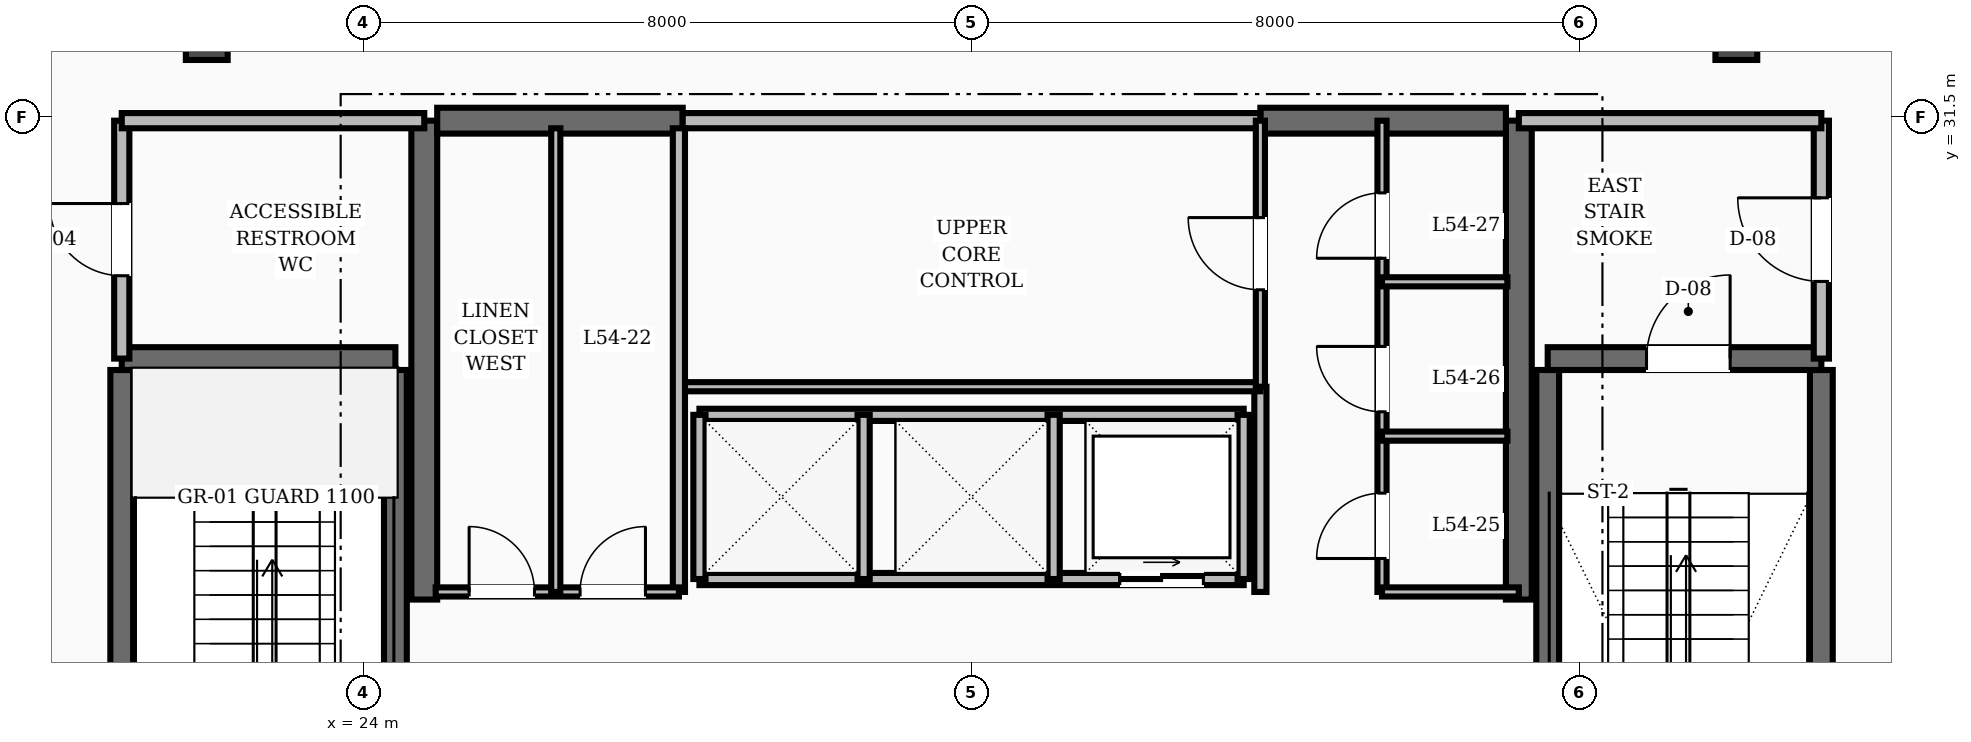
"""IFC4 building model, lengths in metres.
Left out: names, types, materials, properties, quantities, classifications, styles, units other than length and angle.
Written with IfcOpenShell. Run it as: python <this file> out.ifc"""

import sys

from ifc_helpers import new_model, si_unit, direction, frame, frame_2d, origin, place, context, subcontext, project, spatial, rectangle, extrude, element, fill, save


model = new_model("IFC4")
c1 = context("Model", 3, precision=1e-05, world=origin(), true_north=direction((0.0, 1.0)))
c2 = subcontext(c1, "Body", "Model", "MODEL_VIEW")
j1 = project(units=[si_unit("LENGTHUNIT", "METRE"), si_unit("PLANEANGLEUNIT", "RADIAN")], contexts=[c1])
p1 = place(None, origin())
s1 = spatial("IfcSite", under=j1, at=p1, CompositionType="ELEMENT")
p2 = place(p1, origin())
s2 = spatial("IfcBuilding", under=s1, at=p2, CompositionType="ELEMENT")
p3 = place(p2, frame((0.0, 0.0, 208.4)))
s3 = spatial("IfcBuildingStorey", under=s2, at=p3, CompositionType="ELEMENT", Elevation=208.4)
for number, where, z_axis, x_axis in (
    (1, (24.8, 25.15, 0.0), (0.0, 0.0, 1.0), (0.0, 1.0, 0.0)),
    (2, (39.2, 25.15, 0.0), (0.0, 0.0, 1.0), (0.0, 1.0, 0.0)),
):
    element("IfcWall", number, at=place(p3, frame(where, z_axis=z_axis, x_axis=x_axis)), inside=s3, PredefinedType="SHEAR", context=c2, shape_type="SweptSolid", body=[
        extrude(rectangle(XDim=6.3, YDim=0.34, at=frame_2d((3.15, 0.0))), origin(), (0.0, 0.0, 1.0), 6.4),
    ])
for number, where, z_axis, x_axis in (
    (3, (24.97, 31.45, 0.0), (0.0, 0.0, 1.0), (1.0, 0.0, 0.0)),
    (4, (35.8, 31.45, 0.0), (0.0, 0.0, 1.0), (1.0, 0.0, 0.0)),
):
    element("IfcWall", number, at=place(p3, frame(where, z_axis=z_axis, x_axis=x_axis)), inside=s3, PredefinedType="SHEAR", context=c2, shape_type="SweptSolid", body=[
        extrude(rectangle(XDim=3.23, YDim=0.34, at=frame_2d((1.615, 0.0))), origin(), (0.0, 0.0, 1.0), 6.4),
    ])
for number, where, z_axis, x_axis in (
    (5, (20.82, 19.43, 0.0), (0.0, 0.0, 1.0), (0.0, 1.0, 0.0)),
    (6, (24.42, 19.43, 0.0), (0.0, 0.0, 1.0), (0.0, 1.0, 0.0)),
):
    element("IfcWall", number, at=place(p3, frame(where, z_axis=z_axis, x_axis=x_axis)), inside=s3, PredefinedType="SHEAR", context=c2, shape_type="SweptSolid", body=[
        extrude(rectangle(XDim=8.74, YDim=0.3, at=frame_2d((4.37, 0.0))), origin(), (0.0, 0.0, 1.0), 6.4),
    ])
p4 = place(p3, frame((20.82, 28.32, 0.0), z_axis=(0.0, 0.0, 1.0), x_axis=(1.0, 0.0, 0.0)))
e7 = element("IfcWall", 7, at=p4, inside=s3, PredefinedType="SHEAR", context=c2, shape_type="SweptSolid", body=[
    extrude(rectangle(XDim=3.6, YDim=0.3, at=frame_2d((1.8, 0.0))), origin(), (0.0, 0.0, 1.0), 6.4),
])
for number, where, z_axis, x_axis in (
    (8, (43.18, 19.43, 0.0), (0.0, 0.0, 1.0), (0.0, 1.0, 0.0)),
    (9, (39.58, 19.43, 0.0), (0.0, 0.0, 1.0), (0.0, 1.0, 0.0)),
):
    element("IfcWall", number, at=place(p3, frame(where, z_axis=z_axis, x_axis=x_axis)), inside=s3, PredefinedType="SHEAR", context=c2, shape_type="SweptSolid", body=[
        extrude(rectangle(XDim=8.74, YDim=0.3, at=frame_2d((4.37, 0.0))), origin(), (0.0, 0.0, 1.0), 6.4),
    ])
p5 = place(p3, frame((39.58, 28.32, 0.0), z_axis=(0.0, 0.0, 1.0), x_axis=(1.0, 0.0, 0.0)))
e10 = element("IfcWall", 10, at=p5, inside=s3, PredefinedType="SHEAR", context=c2, shape_type="SweptSolid", body=[
    extrude(rectangle(XDim=3.6, YDim=0.3, at=frame_2d((1.8, 0.0))), origin(), (0.0, 0.0, 1.0), 6.4),
])
p6 = place(p5, frame((1.3, 0.0, 0.0)))
e11 = element("IfcOpeningElement", 11, at=p6, cuts=e10, PredefinedType="OPENING", context=c2, shape_type="SweptSolid", body=[
    extrude(rectangle(XDim=1.1, YDim=2.1, at=frame_2d((0.55, 1.05))), frame((0.0, 0.16, 0.0), z_axis=(0.0, -1.0, 0.0), x_axis=(1.0, 0.0, 0.0)), (0.0, 0.0, 1.0), 0.32),
])
p7 = place(p3, frame((43.18, 28.32, 0.0), z_axis=(0.0, 0.0, 1.0), x_axis=(0.0, 1.0, 0.0)))
e12 = element("IfcWall", 12, at=p7, inside=s3, PredefinedType="SOLIDWALL", context=c2, shape_type="SweptSolid", body=[
    extrude(rectangle(XDim=3.13, YDim=0.2, at=frame_2d((1.565, 0.0))), origin(), (0.0, 0.0, 1.0), 5.13),
])
p8 = place(p7, frame((1.015, 0.0, 0.0)))
e13 = element("IfcOpeningElement", 13, at=p8, cuts=e12, PredefinedType="OPENING", context=c2, shape_type="SweptSolid", body=[
    extrude(rectangle(XDim=1.1, YDim=2.1, at=frame_2d((0.55, 1.05))), frame((0.0, 0.11, 0.0), z_axis=(0.0, -1.0, 0.0), x_axis=(1.0, 0.0, 0.0)), (0.0, 0.0, 1.0), 0.22),
])
p9 = place(p3, frame((39.2, 31.45, 0.0), z_axis=(0.0, 0.0, 1.0), x_axis=(1.0, 0.0, 0.0)))
e14 = element("IfcWall", 14, at=p9, inside=s3, PredefinedType="SOLIDWALL", context=c2, shape_type="SweptSolid", body=[
    extrude(rectangle(XDim=3.98, YDim=0.2, at=frame_2d((1.99, 0.0))), origin(), (0.0, 0.0, 1.0), 5.13),
])
p10 = place(p3, frame((20.82, 28.32, 0.0), z_axis=(0.0, 0.0, 1.0), x_axis=(0.0, 1.0, 0.0)))
e15 = element("IfcWall", 15, at=p10, inside=s3, PredefinedType="SOLIDWALL", context=c2, shape_type="SweptSolid", body=[
    extrude(rectangle(XDim=3.13, YDim=0.2, at=frame_2d((1.565, 0.0))), origin(), (0.0, 0.0, 1.0), 5.13),
])
p11 = place(p10, frame((1.09, 0.0, 0.0)))
e16 = element("IfcOpeningElement", 16, at=p11, cuts=e15, PredefinedType="OPENING", context=c2, shape_type="SweptSolid", body=[
    extrude(rectangle(XDim=0.95, YDim=2.1, at=frame_2d((0.475, 1.05))), frame((0.0, 0.11, 0.0), z_axis=(0.0, -1.0, 0.0), x_axis=(1.0, 0.0, 0.0)), (0.0, 0.0, 1.0), 0.22),
])
p12 = place(p3, frame((20.82, 31.45, 0.0), z_axis=(0.0, 0.0, 1.0), x_axis=(1.0, 0.0, 0.0)))
e17 = element("IfcWall", 17, at=p12, inside=s3, PredefinedType="SOLIDWALL", context=c2, shape_type="SweptSolid", body=[
    extrude(rectangle(XDim=3.98, YDim=0.2, at=frame_2d((1.99, 0.0))), origin(), (0.0, 0.0, 1.0), 5.13),
])
p13 = place(p3, frame((35.8, 25.25, 0.0), z_axis=(0.0, 0.0, 1.0), x_axis=(0.0, 1.0, 0.0)))
e18 = element("IfcWall", 18, at=p13, inside=s3, PredefinedType="SOLIDWALL", context=c2, shape_type="SweptSolid", body=[
    extrude(rectangle(XDim=2.7, YDim=0.16, at=frame_2d((1.35, 0.0))), origin(), (0.0, 0.0, 1.0), 5.13),
])
p14 = place(p3, frame((28.42, 25.42, 0.0), z_axis=(0.0, 0.0, 1.0), x_axis=(1.0, 0.0, 0.0)))
e19 = element("IfcWall", 19, at=p14, inside=s3, PredefinedType="SOLIDWALL", context=c2, shape_type="SweptSolid", body=[
    extrude(rectangle(XDim=7.16, YDim=0.16, at=frame_2d((3.58, 0.0))), origin(), (0.0, 0.0, 1.0), 5.13),
])
p15 = place(p14, frame((5.53, 0.0, 0.0)))
e20 = element("IfcOpeningElement", 20, at=p15, cuts=e19, PredefinedType="OPENING", context=c2, shape_type="SweptSolid", body=[
    extrude(rectangle(XDim=1.1, YDim=2.15, at=frame_2d((0.55, 1.075))), frame((0.0, 0.09, 0.0), z_axis=(0.0, -1.0, 0.0), x_axis=(1.0, 0.0, 0.0)), (0.0, 0.0, 1.0), 0.18),
])
p16 = place(p3, frame((28.42, 27.58, 0.0), z_axis=(0.0, 0.0, 1.0), x_axis=(1.0, 0.0, 0.0)))
e21 = element("IfcWall", 21, at=p16, inside=s3, PredefinedType="SOLIDWALL", context=c2, shape_type="SweptSolid", body=[
    extrude(rectangle(XDim=7.16, YDim=0.16, at=frame_2d((3.58, 0.0))), origin(), (0.0, 0.0, 1.0), 5.13),
])
for number, where, z_axis, x_axis in (
    (22, (28.42, 25.42, 0.0), (0.0, 0.0, 1.0), (0.0, 1.0, 0.0)),
    (23, (30.58, 25.42, 0.0), (0.0, 0.0, 1.0), (0.0, 1.0, 0.0)),
    (24, (33.08, 25.42, 0.0), (0.0, 0.0, 1.0), (0.0, 1.0, 0.0)),
    (25, (35.58, 25.42, 0.0), (0.0, 0.0, 1.0), (0.0, 1.0, 0.0)),
):
    element("IfcWall", number, at=place(p3, frame(where, z_axis=z_axis, x_axis=x_axis)), inside=s3, PredefinedType="SOLIDWALL", context=c2, shape_type="SweptSolid", body=[
        extrude(rectangle(XDim=2.16, YDim=0.16, at=frame_2d((1.08, 0.0))), origin(), (0.0, 0.0, 1.0), 5.13),
    ])
p17 = place(p3, frame((28.2, 31.45, 0.0), z_axis=(0.0, 0.0, 1.0), x_axis=(1.0, 0.0, 0.0)))
e26 = element("IfcWall", 26, at=p17, inside=s3, PredefinedType="SOLIDWALL", context=c2, shape_type="SweptSolid", body=[
    extrude(rectangle(XDim=7.6, YDim=0.2, at=frame_2d((3.8, 0.0))), origin(), (0.0, 0.0, 1.0), 5.13),
])
p18 = place(p3, frame((28.2, 27.95, 0.0), z_axis=(0.0, 0.0, 1.0), x_axis=(1.0, 0.0, 0.0)))
e27 = element("IfcWall", 27, at=p18, inside=s3, PredefinedType="PARTITIONING", context=c2, shape_type="SweptSolid", body=[
    extrude(rectangle(XDim=7.6, YDim=0.12, at=frame_2d((3.8, 0.0))), origin(), (0.0, 0.0, 1.0), 5.13),
])
p19 = place(p3, frame((35.8, 27.95, 0.0), z_axis=(0.0, 0.0, 1.0), x_axis=(0.0, 1.0, 0.0)))
e28 = element("IfcWall", 28, at=p19, inside=s3, PredefinedType="PARTITIONING", context=c2, shape_type="SweptSolid", body=[
    extrude(rectangle(XDim=3.5, YDim=0.12, at=frame_2d((1.75, 0.0))), origin(), (0.0, 0.0, 1.0), 5.13),
])
p20 = place(p19, frame((1.275, 0.0, 0.0)))
e29 = element("IfcOpeningElement", 29, at=p20, cuts=e28, PredefinedType="OPENING", context=c2, shape_type="SweptSolid", body=[
    extrude(rectangle(XDim=0.95, YDim=2.1, at=frame_2d((0.475, 1.05))), frame((0.0, 0.07, 0.0), z_axis=(0.0, -1.0, 0.0), x_axis=(1.0, 0.0, 0.0)), (0.0, 0.0, 1.0), 0.14),
])
p21 = place(p3, frame((28.15, 25.25, 0.0), z_axis=(0.0, 0.0, 1.0), x_axis=(0.0, 1.0, 0.0)))
e30 = element("IfcWall", 30, at=p21, inside=s3, PredefinedType="SOLIDWALL", context=c2, shape_type="SweptSolid", body=[
    extrude(rectangle(XDim=6.1, YDim=0.16, at=frame_2d((3.05, 0.0))), origin(), (0.0, 0.0, 1.0), 5.13),
])
p22 = place(p3, frame((24.95, 25.25, 0.0), z_axis=(0.0, 0.0, 1.0), x_axis=(1.0, 0.0, 0.0)))
e31 = element("IfcWall", 31, at=p22, inside=s3, PredefinedType="PARTITIONING", context=c2, shape_type="SweptSolid", body=[
    extrude(rectangle(XDim=3.2, YDim=0.12, at=frame_2d((1.6, 0.0))), origin(), (0.0, 0.0, 1.0), 5.13),
])
p23 = place(p22, frame((0.44, 0.0, 0.0)))
e32 = element("IfcOpeningElement", 32, at=p23, cuts=e31, PredefinedType="OPENING", context=c2, shape_type="SweptSolid", body=[
    extrude(rectangle(XDim=0.86, YDim=2.1, at=frame_2d((0.43, 1.05))), frame((0.0, 0.07, 0.0), z_axis=(0.0, -1.0, 0.0), x_axis=(1.0, 0.0, 0.0)), (0.0, 0.0, 1.0), 0.14),
])
p24 = place(p22, frame((1.9, 0.0, 0.0)))
e33 = element("IfcOpeningElement", 33, at=p24, cuts=e31, PredefinedType="OPENING", context=c2, shape_type="SweptSolid", body=[
    extrude(rectangle(XDim=0.86, YDim=2.1, at=frame_2d((0.43, 1.05))), frame((0.0, 0.07, 0.0), z_axis=(0.0, -1.0, 0.0), x_axis=(1.0, 0.0, 0.0)), (0.0, 0.0, 1.0), 0.14),
])
p25 = place(p3, frame((37.4, 25.25, 0.0), z_axis=(0.0, 0.0, 1.0), x_axis=(0.0, 1.0, 0.0)))
e34 = element("IfcWall", 34, at=p25, inside=s3, PredefinedType="PARTITIONING", context=c2, shape_type="SweptSolid", body=[
    extrude(rectangle(XDim=6.2, YDim=0.12, at=frame_2d((3.1, 0.0))), origin(), (0.0, 0.0, 1.0), 5.13),
])
p26 = place(p25, frame((0.44, 0.0, 0.0)))
e35 = element("IfcOpeningElement", 35, at=p26, cuts=e34, PredefinedType="OPENING", context=c2, shape_type="SweptSolid", body=[
    extrude(rectangle(XDim=0.86, YDim=2.1, at=frame_2d((0.43, 1.05))), frame((0.0, 0.07, 0.0), z_axis=(0.0, -1.0, 0.0), x_axis=(1.0, 0.0, 0.0)), (0.0, 0.0, 1.0), 0.14),
])
p27 = place(p25, frame((2.37, 0.0, 0.0)))
e36 = element("IfcOpeningElement", 36, at=p27, cuts=e34, PredefinedType="OPENING", context=c2, shape_type="SweptSolid", body=[
    extrude(rectangle(XDim=0.86, YDim=2.1, at=frame_2d((0.43, 1.05))), frame((0.0, 0.07, 0.0), z_axis=(0.0, -1.0, 0.0), x_axis=(1.0, 0.0, 0.0)), (0.0, 0.0, 1.0), 0.14),
])
p28 = place(p25, frame((4.39, 0.0, 0.0)))
e37 = element("IfcOpeningElement", 37, at=p28, cuts=e34, PredefinedType="OPENING", context=c2, shape_type="SweptSolid", body=[
    extrude(rectangle(XDim=0.86, YDim=2.1, at=frame_2d((0.43, 1.05))), frame((0.0, 0.07, 0.0), z_axis=(0.0, -1.0, 0.0), x_axis=(1.0, 0.0, 0.0)), (0.0, 0.0, 1.0), 0.14),
])
p29 = place(p3, frame((37.4, 25.25, 0.0), z_axis=(0.0, 0.0, 1.0), x_axis=(1.0, 0.0, 0.0)))
e38 = element("IfcWall", 38, at=p29, inside=s3, PredefinedType="PARTITIONING", context=c2, shape_type="SweptSolid", body=[
    extrude(rectangle(XDim=1.8, YDim=0.12, at=frame_2d((0.9, 0.0))), origin(), (0.0, 0.0, 1.0), 5.13),
])
p30 = place(p3, frame((26.53, 25.25, 0.0), z_axis=(0.0, 0.0, 1.0), x_axis=(0.0, 1.0, 0.0)))
e39 = element("IfcWall", 39, at=p30, inside=s3, PredefinedType="PARTITIONING", context=c2, shape_type="SweptSolid", body=[
    extrude(rectangle(XDim=6.1, YDim=0.12, at=frame_2d((3.05, 0.0))), origin(), (0.0, 0.0, 1.0), 5.13),
])
for number, where, z_axis, x_axis in (
    (40, (37.4, 27.3, 0.0), (0.0, 0.0, 1.0), (1.0, 0.0, 0.0)),
    (41, (37.4, 29.33, 0.0), (0.0, 0.0, 1.0), (1.0, 0.0, 0.0)),
):
    element("IfcWall", number, at=place(p3, frame(where, z_axis=z_axis, x_axis=x_axis)), inside=s3, PredefinedType="PARTITIONING", context=c2, shape_type="SweptSolid", body=[
        extrude(rectangle(XDim=1.65, YDim=0.12, at=frame_2d((0.825, 0.0))), origin(), (0.0, 0.0, 1.0), 5.13),
    ])
p31 = place(p6, origin())
e42 = element("IfcDoor", 42, at=p31, inside=s3, OperationType="SINGLE_SWING_RIGHT", PredefinedType="DOOR", context=c2, shape_type="SweptSolid", body=[
    extrude(rectangle(XDim=1.1, YDim=2.1, at=frame_2d((0.55, 1.05))), frame((0.0, 0.025, 0.0), z_axis=(0.0, -1.0, 0.0), x_axis=(1.0, 0.0, 0.0)), (0.0, 0.0, 1.0), 0.05),
])
fill(e11, e42)
p32 = place(p8, origin())
e43 = element("IfcDoor", 43, at=p32, inside=s3, OperationType="SINGLE_SWING_RIGHT", PredefinedType="DOOR", context=c2, shape_type="SweptSolid", body=[
    extrude(rectangle(XDim=1.1, YDim=2.1, at=frame_2d((0.55, 1.05))), frame((0.0, 0.025, 0.0), z_axis=(0.0, -1.0, 0.0), x_axis=(1.0, 0.0, 0.0)), (0.0, 0.0, 1.0), 0.05),
])
fill(e13, e43)
p33 = place(p11, origin())
e44 = element("IfcDoor", 44, at=p33, inside=s3, OperationType="SINGLE_SWING_RIGHT", PredefinedType="DOOR", context=c2, shape_type="SweptSolid", body=[
    extrude(rectangle(XDim=0.95, YDim=2.1, at=frame_2d((0.475, 1.05))), frame((0.0, 0.025, 0.0), z_axis=(0.0, -1.0, 0.0), x_axis=(1.0, 0.0, 0.0)), (0.0, 0.0, 1.0), 0.05),
])
fill(e16, e44)
p34 = place(p15, origin())
e45 = element("IfcDoor", 45, at=p34, inside=s3, OperationType="SLIDING_TO_RIGHT", PredefinedType="DOOR", context=c2, shape_type="SweptSolid", body=[
    extrude(rectangle(XDim=1.1, YDim=2.15, at=frame_2d((0.55, 1.075))), frame((0.0, 0.025, 0.0), z_axis=(0.0, -1.0, 0.0), x_axis=(1.0, 0.0, 0.0)), (0.0, 0.0, 1.0), 0.05),
])
fill(e20, e45)
p35 = place(p20, origin())
e46 = element("IfcDoor", 46, at=p35, inside=s3, OperationType="SINGLE_SWING_RIGHT", PredefinedType="DOOR", context=c2, shape_type="SweptSolid", body=[
    extrude(rectangle(XDim=0.95, YDim=2.1, at=frame_2d((0.475, 1.05))), frame((0.0, 0.025, 0.0), z_axis=(0.0, -1.0, 0.0), x_axis=(1.0, 0.0, 0.0)), (0.0, 0.0, 1.0), 0.05),
])
fill(e29, e46)
p36 = place(p23, origin())
e47 = element("IfcDoor", 47, at=p36, inside=s3, OperationType="SINGLE_SWING_LEFT", PredefinedType="DOOR", context=c2, shape_type="SweptSolid", body=[
    extrude(rectangle(XDim=0.86, YDim=2.1, at=frame_2d((0.43, 1.05))), frame((0.0, 0.025, 0.0), z_axis=(0.0, -1.0, 0.0), x_axis=(1.0, 0.0, 0.0)), (0.0, 0.0, 1.0), 0.05),
])
fill(e32, e47)
p37 = place(p24, origin())
e48 = element("IfcDoor", 48, at=p37, inside=s3, OperationType="SINGLE_SWING_RIGHT", PredefinedType="DOOR", context=c2, shape_type="SweptSolid", body=[
    extrude(rectangle(XDim=0.86, YDim=2.1, at=frame_2d((0.43, 1.05))), frame((0.0, 0.025, 0.0), z_axis=(0.0, -1.0, 0.0), x_axis=(1.0, 0.0, 0.0)), (0.0, 0.0, 1.0), 0.05),
])
fill(e33, e48)
p38 = place(p26, origin())
e49 = element("IfcDoor", 49, at=p38, inside=s3, OperationType="SINGLE_SWING_LEFT", PredefinedType="DOOR", context=c2, shape_type="SweptSolid", body=[
    extrude(rectangle(XDim=0.86, YDim=2.1, at=frame_2d((0.43, 1.05))), frame((0.0, 0.025, 0.0), z_axis=(0.0, -1.0, 0.0), x_axis=(1.0, 0.0, 0.0)), (0.0, 0.0, 1.0), 0.05),
])
fill(e35, e49)
p39 = place(p27, origin())
e50 = element("IfcDoor", 50, at=p39, inside=s3, OperationType="SINGLE_SWING_RIGHT", PredefinedType="DOOR", context=c2, shape_type="SweptSolid", body=[
    extrude(rectangle(XDim=0.86, YDim=2.1, at=frame_2d((0.43, 1.05))), frame((0.0, 0.025, 0.0), z_axis=(0.0, -1.0, 0.0), x_axis=(1.0, 0.0, 0.0)), (0.0, 0.0, 1.0), 0.05),
])
fill(e36, e50)
p40 = place(p28, origin())
e51 = element("IfcDoor", 51, at=p40, inside=s3, OperationType="SINGLE_SWING_LEFT", PredefinedType="DOOR", context=c2, shape_type="SweptSolid", body=[
    extrude(rectangle(XDim=0.86, YDim=2.1, at=frame_2d((0.43, 1.05))), frame((0.0, 0.025, 0.0), z_axis=(0.0, -1.0, 0.0), x_axis=(1.0, 0.0, 0.0)), (0.0, 0.0, 1.0), 0.05),
])
fill(e37, e51)
save(model, sys.argv[1])
